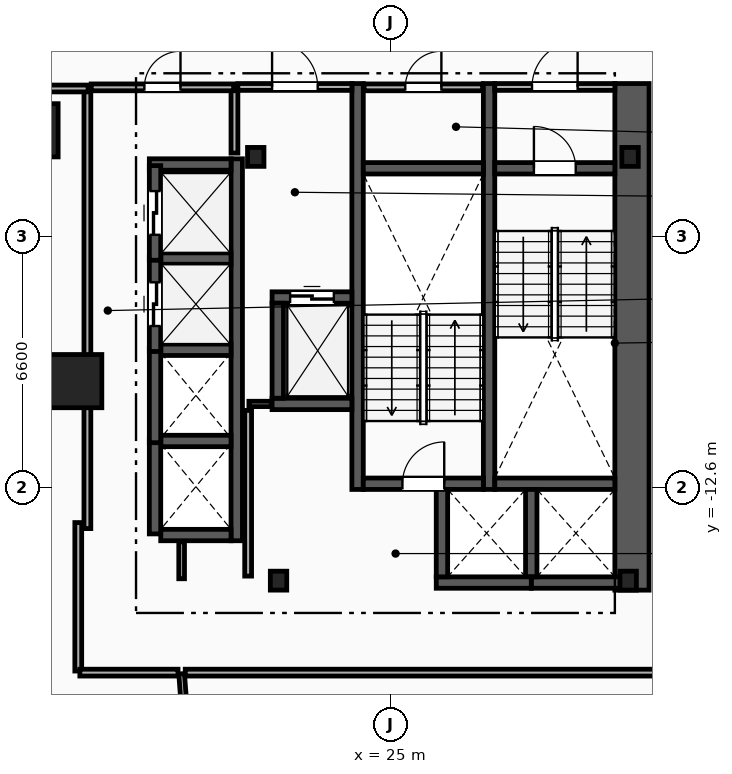
"""IFC4 building model, lengths in metres.
Left out: names, types, materials, properties, quantities, classifications, styles, units other than length and angle.
Written with IfcOpenShell. Run it as: python <this file> out.ifc"""

import sys

from ifc_helpers import new_model, si_unit, direction, frame, frame_2d, origin, origin_2d, place, context, subcontext, project, spatial, rectangle, i_section, extrude, element, fill, save


model = new_model("IFC4")
c1 = context("Model", 3, precision=1e-05, world=origin(), true_north=direction((0.0, 1.0)))
c2 = subcontext(c1, "Body", "Model", "MODEL_VIEW")
j1 = project(units=[si_unit("LENGTHUNIT", "METRE"), si_unit("PLANEANGLEUNIT", "RADIAN")], contexts=[c1])
p1 = place(None, origin())
s1 = spatial("IfcSite", under=j1, at=p1, CompositionType="ELEMENT")
p2 = place(p1, origin())
s2 = spatial("IfcBuilding", under=s1, at=p2, CompositionType="ELEMENT")
p3 = place(p2, frame((0.0, 0.0, 20.0)))
s3 = spatial("IfcBuildingStorey", under=s2, at=p3, CompositionType="ELEMENT", Elevation=20.0)
for number, where, z_axis, x_axis in (
    (1, (31.3, -3.9, 0.0), (0.0, 0.0, 1.0), (1.0, 0.0, 0.0)),
    (2, (21.45, -3.9, 0.0), (0.0, 0.0, 1.0), (1.0, 0.0, 0.0)),
    (3, (22.05, -15.05, 0.0), (0.0, 0.0, 1.0), (1.0, 0.0, 0.0)),
    (4, (31.25, -15.05, 0.0), (0.0, 0.0, 1.0), (1.0, 0.0, 0.0)),
):
    element("IfcColumn", number, at=place(p3, frame(where, z_axis=z_axis, x_axis=x_axis)), inside=s3, PredefinedType="COLUMN", context=c2, shape_type="SweptSolid", body=[
        extrude(i_section(OverallWidth=0.432, OverallDepth=0.498, WebThickness=0.056, FlangeThickness=0.089, FilletRadius=0.018, at=origin_2d()), origin(), (0.0, 0.0, 1.0), 4.0),
    ])
for number, where, z_axis, x_axis in (
    (5, (15.55, -3.2, 0.0), (0.0, 0.0, 1.0), (1.0, 0.0, 0.0)),
    (6, (16.7, -9.8, 0.0), (0.0, 0.0, 1.0), (1.0, 0.0, 0.0)),
):
    element("IfcColumn", number, at=place(p3, frame(where, z_axis=z_axis, x_axis=x_axis)), inside=s3, PredefinedType="COLUMN", context=c2, shape_type="SweptSolid", body=[
        extrude(rectangle(XDim=1.4, YDim=1.4, at=origin_2d()), origin(), (0.0, 0.0, 1.0), 4.0),
    ])
p4 = place(p3, frame((31.35, -15.3, 0.0), z_axis=(0.0, 0.0, 1.0), x_axis=(0.0, 1.0, 0.0)))
e7 = element("IfcWall", 7, at=p4, inside=s3, PredefinedType="SHEAR", context=c2, shape_type="SweptSolid", body=[
    extrude(rectangle(XDim=13.33, YDim=0.9, at=frame_2d((6.665, 0.0))), origin(), (0.0, 0.0, 1.0), 3.7),
])
for number, where, z_axis, x_axis in (
    (8, (27.59, -12.65, 0.0), (0.0, 0.0, 1.0), (0.0, 1.0, 0.0)),
    (9, (24.13, -12.65, 0.0), (0.0, 0.0, 1.0), (0.0, 1.0, 0.0)),
):
    element("IfcWall", number, at=place(p3, frame(where, z_axis=z_axis, x_axis=x_axis)), inside=s3, PredefinedType="SHEAR", context=c2, shape_type="SweptSolid", body=[
        extrude(rectangle(XDim=10.68, YDim=0.3, at=frame_2d((5.34, 0.0))), origin(), (0.0, 0.0, 1.0), 3.7),
    ])
p5 = place(p3, frame((27.74, -4.2, 0.0), z_axis=(0.0, 0.0, 1.0), x_axis=(1.0, 0.0, 0.0)))
e10 = element("IfcWall", 10, at=p5, inside=s3, PredefinedType="SHEAR", context=c2, shape_type="SweptSolid", body=[
    extrude(rectangle(XDim=3.16, YDim=0.3, at=frame_2d((1.58, 0.0))), origin(), (0.0, 0.0, 1.0), 3.7),
])
p6 = place(p5, frame((1.03, 0.0, 0.0)))
e11 = element("IfcOpeningElement", 11, at=p6, cuts=e10, PredefinedType="OPENING", context=c2, shape_type="SweptSolid", body=[
    extrude(rectangle(XDim=1.1, YDim=2.15, at=frame_2d((0.55, 1.075))), frame((0.0, 0.16, 0.0), z_axis=(0.0, -1.0, 0.0), x_axis=(1.0, 0.0, 0.0)), (0.0, 0.0, 1.0), 0.32),
])
p7 = place(p3, frame((27.74, -12.5, 0.0), z_axis=(0.0, 0.0, 1.0), x_axis=(1.0, 0.0, 0.0)))
e12 = element("IfcWall", 12, at=p7, inside=s3, PredefinedType="SHEAR", context=c2, shape_type="SweptSolid", body=[
    extrude(rectangle(XDim=3.16, YDim=0.3, at=frame_2d((1.58, 0.0))), origin(), (0.0, 0.0, 1.0), 3.7),
])
p8 = place(p3, frame((24.28, -12.5, 0.0), z_axis=(0.0, 0.0, 1.0), x_axis=(1.0, 0.0, 0.0)))
e13 = element("IfcWall", 13, at=p8, inside=s3, PredefinedType="SHEAR", context=c2, shape_type="SweptSolid", body=[
    extrude(rectangle(XDim=3.16, YDim=0.3, at=frame_2d((1.58, 0.0))), origin(), (0.0, 0.0, 1.0), 3.7),
])
p9 = place(p8, frame((1.03, 0.0, 0.0)))
e14 = element("IfcOpeningElement", 14, at=p9, cuts=e13, PredefinedType="OPENING", context=c2, shape_type="SweptSolid", body=[
    extrude(rectangle(XDim=1.1, YDim=2.15, at=frame_2d((0.55, 1.075))), frame((0.0, 0.16, 0.0), z_axis=(0.0, -1.0, 0.0), x_axis=(1.0, 0.0, 0.0)), (0.0, 0.0, 1.0), 0.32),
])
p10 = place(p3, frame((24.28, -4.2, 0.0), z_axis=(0.0, 0.0, 1.0), x_axis=(1.0, 0.0, 0.0)))
e15 = element("IfcWall", 15, at=p10, inside=s3, PredefinedType="SHEAR", context=c2, shape_type="SweptSolid", body=[
    extrude(rectangle(XDim=3.16, YDim=0.3, at=frame_2d((1.58, 0.0))), origin(), (0.0, 0.0, 1.0), 3.7),
])
p11 = place(p3, frame((20.89, -3.8, 0.0), z_axis=(0.0, 0.0, 1.0), x_axis=(0.0, 1.0, 0.0)))
e16 = element("IfcWall", 16, at=p11, inside=s3, PredefinedType="PARTITIONING", context=c2, shape_type="SweptSolid", body=[
    extrude(rectangle(XDim=1.65, YDim=0.18, at=frame_2d((0.825, 0.0))), origin(), (0.0, 0.0, 1.0), 3.7),
])
p12 = place(p3, frame((20.98, -2.06, 0.0), z_axis=(0.0, 0.0, 1.0), x_axis=(1.0, 0.0, 0.0)))
e17 = element("IfcWall", 17, at=p12, inside=s3, PredefinedType="PARTITIONING", context=c2, shape_type="SweptSolid", body=[
    extrude(rectangle(XDim=3.0, YDim=0.18, at=frame_2d((1.5, 0.0))), origin(), (0.0, 0.0, 1.0), 3.7),
])
p13 = place(p12, frame((0.9, 0.0, 0.0)))
e18 = element("IfcOpeningElement", 18, at=p13, cuts=e17, PredefinedType="OPENING", context=c2, shape_type="SweptSolid", body=[
    extrude(rectangle(XDim=1.2, YDim=2.15, at=frame_2d((0.6, 1.075))), frame((0.0, 0.1, 0.0), z_axis=(0.0, -1.0, 0.0), x_axis=(1.0, 0.0, 0.0)), (0.0, 0.0, 1.0), 0.2),
])
p14 = place(p3, frame((27.74, -2.06, 0.0), z_axis=(0.0, 0.0, 1.0), x_axis=(1.0, 0.0, 0.0)))
e19 = element("IfcWall", 19, at=p14, inside=s3, PredefinedType="PARTITIONING", context=c2, shape_type="SweptSolid", body=[
    extrude(rectangle(XDim=3.16, YDim=0.18, at=frame_2d((1.58, 0.0))), origin(), (0.0, 0.0, 1.0), 3.7),
])
p15 = place(p14, frame((0.98, 0.0, 0.0)))
e20 = element("IfcOpeningElement", 20, at=p15, cuts=e19, PredefinedType="OPENING", context=c2, shape_type="SweptSolid", body=[
    extrude(rectangle(XDim=1.2, YDim=2.15, at=frame_2d((0.6, 1.075))), frame((0.0, 0.1, 0.0), z_axis=(0.0, -1.0, 0.0), x_axis=(1.0, 0.0, 0.0)), (0.0, 0.0, 1.0), 0.2),
])
p16 = place(p3, frame((21.88, -7.6, 0.0), z_axis=(0.0, 0.0, 1.0), x_axis=(1.0, 0.0, 0.0)))
e21 = element("IfcWall", 21, at=p16, inside=s3, PredefinedType="SHEAR", context=c2, shape_type="SweptSolid", body=[
    extrude(rectangle(XDim=2.1, YDim=0.3, at=frame_2d((1.05, 0.0))), origin(), (0.0, 0.0, 1.0), 3.7),
])
p17 = place(p16, frame((0.475, 0.0, 0.0)))
e22 = element("IfcOpeningElement", 22, at=p17, cuts=e21, PredefinedType="OPENING", context=c2, shape_type="SweptSolid", body=[
    extrude(rectangle(XDim=1.15, YDim=2.2, at=frame_2d((0.575, 1.1))), frame((0.0, 0.16, 0.0), z_axis=(0.0, -1.0, 0.0), x_axis=(1.0, 0.0, 0.0)), (0.0, 0.0, 1.0), 0.32),
])
p18 = place(p3, frame((21.88, -10.4, 0.0), z_axis=(0.0, 0.0, 1.0), x_axis=(1.0, 0.0, 0.0)))
e23 = element("IfcWall", 23, at=p18, inside=s3, PredefinedType="SHEAR", context=c2, shape_type="SweptSolid", body=[
    extrude(rectangle(XDim=2.1, YDim=0.3, at=frame_2d((1.05, 0.0))), origin(), (0.0, 0.0, 1.0), 3.7),
])
for number, where, z_axis, x_axis in (
    (24, (22.03, -10.25, 0.0), (0.0, 0.0, 1.0), (0.0, 1.0, 0.0)),
    (25, (28.7, -15.1, 0.0), (0.0, 0.0, 1.0), (1.0, 0.0, 0.0)),
):
    element("IfcWall", number, at=place(p3, frame(where, z_axis=z_axis, x_axis=x_axis)), inside=s3, PredefinedType="SHEAR", context=c2, shape_type="SweptSolid", body=[
        extrude(rectangle(XDim=2.5, YDim=0.3, at=frame_2d((1.25, 0.0))), origin(), (0.0, 0.0, 1.0), 3.7),
    ])
p19 = place(p3, frame((28.7, -14.95, 0.0), z_axis=(0.0, 0.0, 1.0), x_axis=(0.0, 1.0, 0.0)))
e26 = element("IfcWall", 26, at=p19, inside=s3, PredefinedType="SHEAR", context=c2, shape_type="SweptSolid", body=[
    extrude(rectangle(XDim=2.3, YDim=0.3, at=frame_2d((1.15, 0.0))), origin(), (0.0, 0.0, 1.0), 3.7),
])
p20 = place(p3, frame((26.2, -15.1, 0.0), z_axis=(0.0, 0.0, 1.0), x_axis=(1.0, 0.0, 0.0)))
e27 = element("IfcWall", 27, at=p20, inside=s3, PredefinedType="SHEAR", context=c2, shape_type="SweptSolid", body=[
    extrude(rectangle(XDim=2.5, YDim=0.3, at=frame_2d((1.25, 0.0))), origin(), (0.0, 0.0, 1.0), 3.7),
])
p21 = place(p3, frame((26.35, -14.95, 0.0), z_axis=(0.0, 0.0, 1.0), x_axis=(0.0, 1.0, 0.0)))
e28 = element("IfcWall", 28, at=p21, inside=s3, PredefinedType="SHEAR", context=c2, shape_type="SweptSolid", body=[
    extrude(rectangle(XDim=2.3, YDim=0.3, at=frame_2d((1.15, 0.0))), origin(), (0.0, 0.0, 1.0), 3.7),
])
p22 = place(p3, frame((20.95, -14.0, 0.0), z_axis=(0.0, 0.0, 1.0), x_axis=(0.0, 1.0, 0.0)))
e29 = element("IfcWall", 29, at=p22, inside=s3, PredefinedType="SHEAR", context=c2, shape_type="SweptSolid", body=[
    extrude(rectangle(XDim=10.05, YDim=0.3, at=frame_2d((5.025, 0.0))), origin(), (0.0, 0.0, 1.0), 3.7),
])
p23 = place(p3, frame((18.95, -13.85, 0.0), z_axis=(0.0, 0.0, 1.0), x_axis=(1.0, 0.0, 0.0)))
e30 = element("IfcWall", 30, at=p23, inside=s3, PredefinedType="SHEAR", context=c2, shape_type="SweptSolid", body=[
    extrude(rectangle(XDim=1.85, YDim=0.3, at=frame_2d((0.925, 0.0))), origin(), (0.0, 0.0, 1.0), 3.7),
])
p24 = place(p3, frame((18.65, -4.1, 0.0), z_axis=(0.0, 0.0, 1.0), x_axis=(1.0, 0.0, 0.0)))
e31 = element("IfcWall", 31, at=p24, inside=s3, PredefinedType="SHEAR", context=c2, shape_type="SweptSolid", body=[
    extrude(rectangle(XDim=2.15, YDim=0.3, at=frame_2d((1.075, 0.0))), origin(), (0.0, 0.0, 1.0), 3.7),
])
for number, where, z_axis, x_axis in (
    (32, (18.95, -11.375, 0.0), (0.0, 0.0, 1.0), (1.0, 0.0, 0.0)),
    (33, (18.95, -8.975, 0.0), (0.0, 0.0, 1.0), (1.0, 0.0, 0.0)),
    (34, (18.95, -6.575, 0.0), (0.0, 0.0, 1.0), (1.0, 0.0, 0.0)),
):
    element("IfcWall", number, at=place(p3, frame(where, z_axis=z_axis, x_axis=x_axis)), inside=s3, PredefinedType="SHEAR", context=c2, shape_type="SweptSolid", body=[
        extrude(rectangle(XDim=1.85, YDim=0.3, at=frame_2d((0.925, 0.0))), origin(), (0.0, 0.0, 1.0), 3.7),
    ])
for number, where, z_axis, x_axis in (
    (35, (18.8, -13.82, 0.0), (0.0, 0.0, 1.0), (0.0, 1.0, 0.0)),
    (36, (18.8, -11.42, 0.0), (0.0, 0.0, 1.0), (0.0, 1.0, 0.0)),
):
    element("IfcWall", number, at=place(p3, frame(where, z_axis=z_axis, x_axis=x_axis)), inside=s3, PredefinedType="SHEAR", context=c2, shape_type="SweptSolid", body=[
        extrude(rectangle(XDim=2.49, YDim=0.3, at=frame_2d((1.245, 0.0))), origin(), (0.0, 0.0, 1.0), 3.7),
    ])
p25 = place(p3, frame((18.8, -9.02, 0.0), z_axis=(0.0, 0.0, 1.0), x_axis=(0.0, 1.0, 0.0)))
e37 = element("IfcWall", 37, at=p25, inside=s3, PredefinedType="SHEAR", context=c2, shape_type="SweptSolid", body=[
    extrude(rectangle(XDim=2.49, YDim=0.3, at=frame_2d((1.245, 0.0))), origin(), (0.0, 0.0, 1.0), 3.7),
])
p26 = place(p25, frame((0.67, 0.0, 0.0)))
e38 = element("IfcOpeningElement", 38, at=p26, cuts=e37, PredefinedType="OPENING", context=c2, shape_type="SweptSolid", body=[
    extrude(rectangle(XDim=1.15, YDim=2.2, at=frame_2d((0.575, 1.1))), frame((0.0, 0.16, 0.0), z_axis=(0.0, -1.0, 0.0), x_axis=(1.0, 0.0, 0.0)), (0.0, 0.0, 1.0), 0.32),
])
p27 = place(p3, frame((18.8, -6.62, 0.0), z_axis=(0.0, 0.0, 1.0), x_axis=(0.0, 1.0, 0.0)))
e39 = element("IfcWall", 39, at=p27, inside=s3, PredefinedType="SHEAR", context=c2, shape_type="SweptSolid", body=[
    extrude(rectangle(XDim=2.49, YDim=0.3, at=frame_2d((1.245, 0.0))), origin(), (0.0, 0.0, 1.0), 3.7),
])
p28 = place(p27, frame((0.67, 0.0, 0.0)))
e40 = element("IfcOpeningElement", 40, at=p28, cuts=e39, PredefinedType="OPENING", context=c2, shape_type="SweptSolid", body=[
    extrude(rectangle(XDim=1.15, YDim=2.2, at=frame_2d((0.575, 1.1))), frame((0.0, 0.16, 0.0), z_axis=(0.0, -1.0, 0.0), x_axis=(1.0, 0.0, 0.0)), (0.0, 0.0, 1.0), 0.32),
])
p29 = place(p3, frame((17.02, -13.68, 0.0), z_axis=(0.0, 0.0, 1.0), x_axis=(0.0, 1.0, 0.0)))
e41 = element("IfcWall", 41, at=p29, inside=s3, PredefinedType="PARTITIONING", context=c2, shape_type="SweptSolid", body=[
    extrude(rectangle(XDim=11.51, YDim=0.18, at=frame_2d((5.755, 0.0))), origin(), (0.0, 0.0, 1.0), 1.9),
])
p30 = place(p3, frame((17.12, -2.07, 0.0), z_axis=(0.0, 0.0, 1.0), x_axis=(1.0, 0.0, 0.0)))
e42 = element("IfcWall", 42, at=p30, inside=s3, PredefinedType="PARTITIONING", context=c2, shape_type="SweptSolid", body=[
    extrude(rectangle(XDim=3.75, YDim=0.18, at=frame_2d((1.875, 0.0))), origin(), (0.0, 0.0, 1.0), 3.7),
])
p31 = place(p30, frame((1.4, 0.0, 0.0)))
e43 = element("IfcOpeningElement", 43, at=p31, cuts=e42, PredefinedType="OPENING", context=c2, shape_type="SweptSolid", body=[
    extrude(rectangle(XDim=0.95, YDim=2.1, at=frame_2d((0.475, 1.05))), frame((0.0, 0.1, 0.0), z_axis=(0.0, -1.0, 0.0), x_axis=(1.0, 0.0, 0.0)), (0.0, 0.0, 1.0), 0.2),
])
p32 = place(p3, frame((21.27, -10.4, 0.0), z_axis=(0.0, 0.0, 1.0), x_axis=(1.0, 0.0, 0.0)))
e44 = element("IfcWall", 44, at=p32, inside=s3, PredefinedType="PARTITIONING", context=c2, shape_type="SweptSolid", body=[
    extrude(rectangle(XDim=0.59, YDim=0.14, at=frame_2d((0.295, 0.0))), origin(), (0.0, 0.0, 1.0), 3.7),
])
p33 = place(p3, frame((21.25, -14.93, 0.0), z_axis=(0.0, 0.0, 1.0), x_axis=(0.0, 1.0, 0.0)))
e45 = element("IfcWall", 45, at=p33, inside=s3, PredefinedType="PARTITIONING", context=c2, shape_type="SweptSolid", body=[
    extrude(rectangle(XDim=4.36, YDim=0.18, at=frame_2d((2.18, 0.0))), origin(), (0.0, 0.0, 1.0), 3.7),
])
p34 = place(p3, frame((24.3, -2.07, 0.0), z_axis=(0.0, 0.0, 1.0), x_axis=(1.0, 0.0, 0.0)))
e46 = element("IfcWall", 46, at=p34, inside=s3, PredefinedType="PARTITIONING", context=c2, shape_type="SweptSolid", body=[
    extrude(rectangle(XDim=3.12, YDim=0.18, at=frame_2d((1.56, 0.0))), origin(), (0.0, 0.0, 1.0), 3.7),
])
p35 = place(p34, frame((1.085, 0.0, 0.0)))
e47 = element("IfcOpeningElement", 47, at=p35, cuts=e46, PredefinedType="OPENING", context=c2, shape_type="SweptSolid", body=[
    extrude(rectangle(XDim=0.95, YDim=2.1, at=frame_2d((0.475, 1.05))), frame((0.0, 0.1, 0.0), z_axis=(0.0, -1.0, 0.0), x_axis=(1.0, 0.0, 0.0)), (0.0, 0.0, 1.0), 0.2),
])
p36 = place(p3, frame((20.29, -28.108, 0.0), z_axis=(0.0, 0.0, 1.0), x_axis=(-0.074269014628, 0.997238243082, 0.0)))
e48 = element("IfcWall", 48, at=p36, inside=s3, PredefinedType="PARTITIONING", context=c2, shape_type="SweptSolid", body=[
    extrude(rectangle(XDim=10.637, YDim=0.15, at=frame_2d((5.319, 0.0))), origin(), (0.0, 0.0, 1.0), 3.7),
])
p37 = place(p36, frame((4.319, 0.0, 1.05)))
e49 = element("IfcOpeningElement", 49, at=p37, cuts=e48, PredefinedType="OPENING", context=c2, shape_type="SweptSolid", body=[
    extrude(rectangle(XDim=2.0, YDim=1.5, at=frame_2d((1.0, 0.75))), frame((0.0, 0.085, 0.0), z_axis=(0.0, -1.0, 0.0), x_axis=(1.0, 0.0, 0.0)), (0.0, 0.0, 1.0), 0.17),
])
p38 = place(p3, frame((19.5, -15.0, 0.0), z_axis=(0.0, 0.0, 1.0), x_axis=(0.0, 1.0, 0.0)))
e50 = element("IfcWall", 50, at=p38, inside=s3, PredefinedType="PARTITIONING", context=c2, shape_type="SweptSolid", body=[
    extrude(rectangle(XDim=0.97, YDim=0.15, at=frame_2d((0.485, 0.0))), origin(), (0.0, 0.0, 1.0), 3.7),
])
p39 = place(p3, frame((0.095, -2.1, 0.0), z_axis=(0.0, 0.0, 1.0), x_axis=(1.0, 0.0, 0.0)))
e51 = element("IfcWall", 51, at=p39, inside=s3, PredefinedType="PARTITIONING", context=c2, shape_type="SweptSolid", body=[
    extrude(rectangle(XDim=16.945, YDim=0.18, at=frame_2d((8.473, 0.0))), origin(), (0.0, 0.0, 1.0), 2.922),
])
p40 = place(p39, frame((7.673, 0.0, 0.0)))
e52 = element("IfcOpeningElement", 52, at=p40, cuts=e51, PredefinedType="OPENING", context=c2, shape_type="SweptSolid", body=[
    extrude(rectangle(XDim=1.6, YDim=2.2, at=frame_2d((0.8, 1.1))), frame((0.0, 0.1, 0.0), z_axis=(0.0, -1.0, 0.0), x_axis=(1.0, 0.0, 0.0)), (0.0, 0.0, 1.0), 0.2),
])
p41 = place(p3, frame((16.78, -13.521, 0.0), z_axis=(0.0, 0.0, 1.0), x_axis=(0.0, -1.0, 0.0)))
e53 = element("IfcWall", 53, at=p41, inside=s3, PredefinedType="PARTITIONING", context=c2, shape_type="SweptSolid", body=[
    extrude(rectangle(XDim=3.907, YDim=0.18, at=frame_2d((1.954, 0.0))), origin(), (0.0, 0.0, 1.0), 3.7),
])
p42 = place(p3, frame((16.822, -17.47, 0.0), z_axis=(0.0, 0.0, 1.0), x_axis=(1.0, 0.0, 0.0)))
e54 = element("IfcWall", 54, at=p42, inside=s3, PredefinedType="PARTITIONING", context=c2, shape_type="SweptSolid", body=[
    extrude(rectangle(XDim=2.583, YDim=0.18, at=frame_2d((1.292, 0.0))), origin(), (0.0, 0.0, 1.0), 3.7),
])
p43 = place(p3, frame((19.595, -17.47, 0.0), z_axis=(0.0, 0.0, 1.0), x_axis=(1.0, 0.0, 0.0)))
e55 = element("IfcWall", 55, at=p43, inside=s3, PredefinedType="PARTITIONING", context=c2, shape_type="SweptSolid", body=[
    extrude(rectangle(XDim=14.033, YDim=0.18, at=frame_2d((7.017, 0.0))), origin(), (0.0, 0.0, 1.0), 1.9),
])
p44 = place(p6, origin())
e56 = element("IfcDoor", 56, at=p44, inside=s3, OperationType="SINGLE_SWING_LEFT", PredefinedType="DOOR", context=c2, shape_type="SweptSolid", body=[
    extrude(rectangle(XDim=1.1, YDim=2.15, at=frame_2d((0.55, 1.075))), frame((0.0, 0.025, 0.0), z_axis=(0.0, -1.0, 0.0), x_axis=(1.0, 0.0, 0.0)), (0.0, 0.0, 1.0), 0.05),
])
fill(e11, e56)
p45 = place(p9, origin())
e57 = element("IfcDoor", 57, at=p45, inside=s3, OperationType="SINGLE_SWING_RIGHT", PredefinedType="DOOR", context=c2, shape_type="SweptSolid", body=[
    extrude(rectangle(XDim=1.1, YDim=2.15, at=frame_2d((0.55, 1.075))), frame((0.0, 0.025, 0.0), z_axis=(0.0, -1.0, 0.0), x_axis=(1.0, 0.0, 0.0)), (0.0, 0.0, 1.0), 0.05),
])
fill(e14, e57)
p46 = place(p13, origin())
e58 = element("IfcDoor", 58, at=p46, inside=s3, OperationType="SINGLE_SWING_LEFT", PredefinedType="DOOR", context=c2, shape_type="SweptSolid", body=[
    extrude(rectangle(XDim=1.2, YDim=2.15, at=frame_2d((0.6, 1.075))), frame((0.0, 0.025, 0.0), z_axis=(0.0, -1.0, 0.0), x_axis=(1.0, 0.0, 0.0)), (0.0, 0.0, 1.0), 0.05),
])
fill(e18, e58)
p47 = place(p15, origin())
e59 = element("IfcDoor", 59, at=p47, inside=s3, OperationType="SINGLE_SWING_RIGHT", PredefinedType="DOOR", context=c2, shape_type="SweptSolid", body=[
    extrude(rectangle(XDim=1.2, YDim=2.15, at=frame_2d((0.6, 1.075))), frame((0.0, 0.025, 0.0), z_axis=(0.0, -1.0, 0.0), x_axis=(1.0, 0.0, 0.0)), (0.0, 0.0, 1.0), 0.05),
])
fill(e20, e59)
p48 = place(p17, origin())
e60 = element("IfcDoor", 60, at=p48, inside=s3, OperationType="SLIDING_TO_LEFT", PredefinedType="TRAPDOOR", context=c2, shape_type="SweptSolid", body=[
    extrude(rectangle(XDim=1.15, YDim=2.2, at=frame_2d((0.575, 1.1))), frame((0.0, 0.025, 0.0), z_axis=(0.0, -1.0, 0.0), x_axis=(1.0, 0.0, 0.0)), (0.0, 0.0, 1.0), 0.05),
])
fill(e22, e60)
p49 = place(p26, origin())
e61 = element("IfcDoor", 61, at=p49, inside=s3, OperationType="SLIDING_TO_LEFT", PredefinedType="TRAPDOOR", context=c2, shape_type="SweptSolid", body=[
    extrude(rectangle(XDim=1.15, YDim=2.2, at=frame_2d((0.575, 1.1))), frame((0.0, 0.025, 0.0), z_axis=(0.0, -1.0, 0.0), x_axis=(1.0, 0.0, 0.0)), (0.0, 0.0, 1.0), 0.05),
])
fill(e38, e61)
p50 = place(p28, origin())
e62 = element("IfcDoor", 62, at=p50, inside=s3, OperationType="SLIDING_TO_LEFT", PredefinedType="TRAPDOOR", context=c2, shape_type="SweptSolid", body=[
    extrude(rectangle(XDim=1.15, YDim=2.2, at=frame_2d((0.575, 1.1))), frame((0.0, 0.025, 0.0), z_axis=(0.0, -1.0, 0.0), x_axis=(1.0, 0.0, 0.0)), (0.0, 0.0, 1.0), 0.05),
])
fill(e40, e62)
p51 = place(p31, origin())
e63 = element("IfcDoor", 63, at=p51, inside=s3, OperationType="SINGLE_SWING_RIGHT", PredefinedType="DOOR", context=c2, shape_type="SweptSolid", body=[
    extrude(rectangle(XDim=0.95, YDim=2.1, at=frame_2d((0.475, 1.05))), frame((0.0, 0.025, 0.0), z_axis=(0.0, -1.0, 0.0), x_axis=(1.0, 0.0, 0.0)), (0.0, 0.0, 1.0), 0.05),
])
fill(e43, e63)
p52 = place(p35, origin())
e64 = element("IfcDoor", 64, at=p52, inside=s3, OperationType="SINGLE_SWING_RIGHT", PredefinedType="DOOR", context=c2, shape_type="SweptSolid", body=[
    extrude(rectangle(XDim=0.95, YDim=2.1, at=frame_2d((0.475, 1.05))), frame((0.0, 0.025, 0.0), z_axis=(0.0, -1.0, 0.0), x_axis=(1.0, 0.0, 0.0)), (0.0, 0.0, 1.0), 0.05),
])
fill(e47, e64)
save(model, sys.argv[1])
